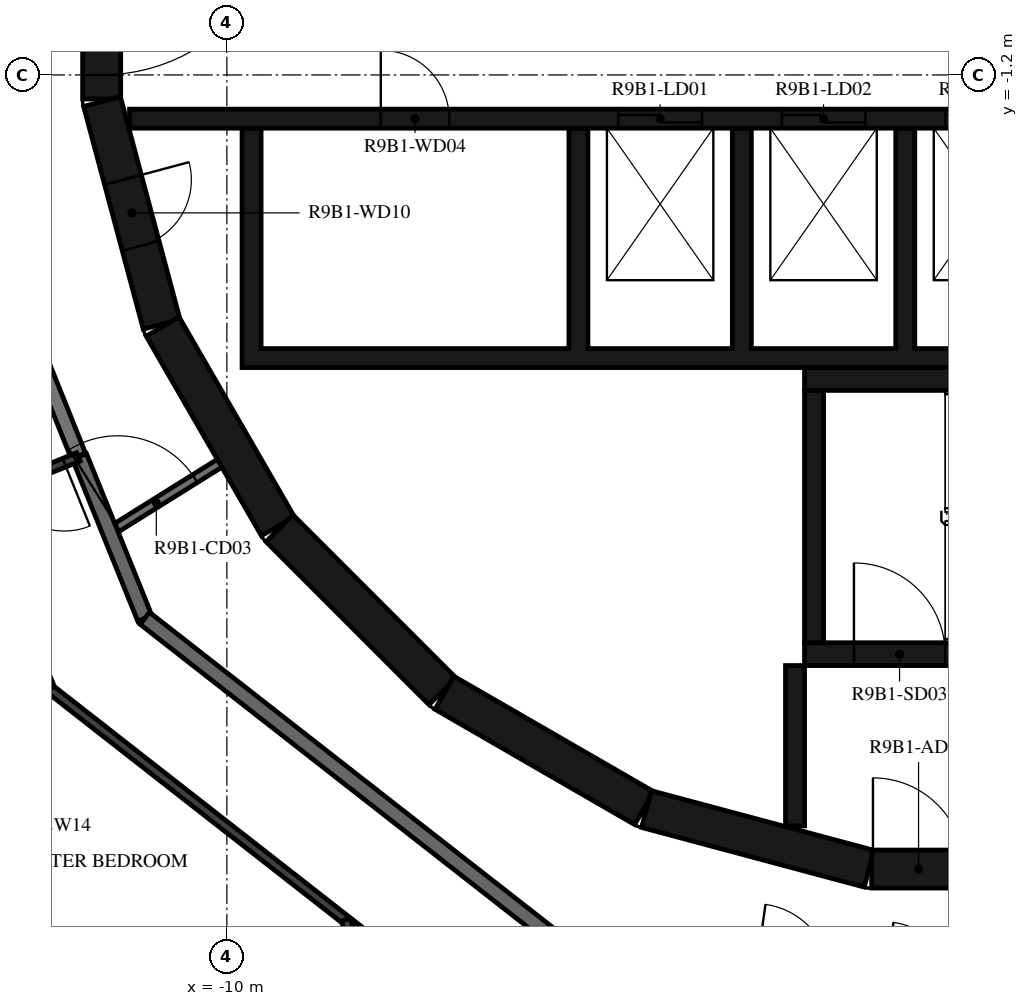
"""IFC4 building model, lengths in metres.
Left out: names, types, materials, properties, quantities, classifications, styles, units other than length and angle.
Written with IfcOpenShell. Run it as: python <this file> out.ifc"""

import sys

from ifc_helpers import new_model, si_unit, direction, frame, frame_2d, origin, place, context, subcontext, project, spatial, polyline, rectangle, outline, extrude, element, fill, save


model = new_model("IFC4")
c1 = context("Model", 3, precision=1e-05, world=origin(), true_north=direction((0.0, 1.0)))
c2 = subcontext(c1, "Body", "Model", "MODEL_VIEW")
j1 = project(units=[si_unit("LENGTHUNIT", "METRE"), si_unit("PLANEANGLEUNIT", "RADIAN")], contexts=[c1])
p1 = place(None, origin())
s1 = spatial("IfcSite", under=j1, at=p1, CompositionType="ELEMENT")
p2 = place(p1, origin())
s2 = spatial("IfcBuilding", under=s1, at=p2, CompositionType="ELEMENT")
p3 = place(p2, frame((0.0, 0.0, 343.5)))
s3 = spatial("IfcBuildingStorey", under=s2, at=p3, CompositionType="ELEMENT", Elevation=343.5)
p4 = place(p3, frame((-11.647, 1.516, 0.0), z_axis=(0.0, 0.0, 1.0), x_axis=(0.0, -1.0, 0.0)))
e1 = element("IfcWall", 1, at=p4, inside=s3, PredefinedType="SHEAR", context=c2, shape_type="SweptSolid", body=[
    extrude(rectangle(XDim=3.033, YDim=0.5, at=frame_2d((1.516, 0.0))), origin(), (0.0, 0.0, 1.0), 3.12),
])
p5 = place(p4, frame((0.316, 0.0, 0.0)))
e2 = element("IfcOpeningElement", 2, at=p5, cuts=e1, PredefinedType="OPENING", context=c2, shape_type="SweptSolid", body=[
    extrude(rectangle(XDim=2.4, YDim=2.1, at=frame_2d((1.2, 1.05))), frame((0.0, 0.26, 0.0), z_axis=(0.0, -1.0, 0.0), x_axis=(1.0, 0.0, 0.0)), (0.0, 0.0, 1.0), 0.52),
])
p6 = place(p3, frame((-11.643, -1.55, 0.0), z_axis=(0.0, 0.0, 1.0), x_axis=(0.258734743916, -0.965948410781, 0.0)))
e3 = element("IfcWall", 3, at=p6, inside=s3, PredefinedType="SHEAR", context=c2, shape_type="SweptSolid", body=[
    extrude(rectangle(XDim=3.033, YDim=0.5, at=frame_2d((1.516, 0.0))), origin(), (0.0, 0.0, 1.0), 3.12),
])
p7 = place(p6, frame((1.066, 0.0, 0.0)))
e4 = element("IfcOpeningElement", 4, at=p7, cuts=e3, PredefinedType="OPENING", context=c2, shape_type="SweptSolid", body=[
    extrude(rectangle(XDim=0.9, YDim=2.1, at=frame_2d((0.45, 1.05))), frame((0.0, 0.26, 0.0), z_axis=(0.0, -1.0, 0.0), x_axis=(1.0, 0.0, 0.0)), (0.0, 0.0, 1.0), 0.52),
])
p8 = place(p3, frame((-10.845, -4.51, 0.0), z_axis=(0.0, 0.0, 1.0), x_axis=(0.500087131594, -0.865975092491, 0.0)))
e5 = element("IfcWall", 5, at=p8, inside=s3, PredefinedType="SHEAR", context=c2, shape_type="SweptSolid", body=[
    extrude(rectangle(XDim=3.033, YDim=0.5, at=frame_2d((1.516, 0.0))), origin(), (0.0, 0.0, 1.0), 3.12),
])
p9 = place(p3, frame((-9.308, -7.164, 0.0), z_axis=(0.0, 0.0, 1.0), x_axis=(0.707106781187, -0.707106781187, 0.0)))
e6 = element("IfcWall", 6, at=p9, inside=s3, PredefinedType="SHEAR", context=c2, shape_type="SweptSolid", body=[
    extrude(rectangle(XDim=3.032, YDim=0.5, at=frame_2d((1.516, 0.0))), origin(), (0.0, 0.0, 1.0), 3.12),
])
for number, where, z_axis, x_axis in (
    (7, (-7.137, -9.329, 0.0), (0.0, 0.0, 1.0), (0.866, -0.5, 0.0)),
    (8, (-4.479, -10.858, 0.0), (0.0, 0.0, 1.0), (0.966, -0.259, 0.0)),
):
    element("IfcWall", number, at=place(p3, frame(where, z_axis=z_axis, x_axis=x_axis)), inside=s3, PredefinedType="SHEAR", context=c2, shape_type="SweptSolid", body=[
        extrude(rectangle(XDim=3.033, YDim=0.5, at=frame_2d((1.516, 0.0))), origin(), (0.0, 0.0, 1.0), 3.12),
    ])
p10 = place(p3, frame((-1.516, -11.647, 0.0), z_axis=(0.0, 0.0, 1.0), x_axis=(1.0, 0.0, 0.0)))
e9 = element("IfcWall", 9, at=p10, inside=s3, PredefinedType="SHEAR", context=c2, shape_type="SweptSolid", body=[
    extrude(rectangle(XDim=3.033, YDim=0.5, at=frame_2d((1.516, 0.0))), origin(), (0.0, 0.0, 1.0), 3.12),
])
p11 = place(p10, frame((0.016, 0.0, 0.0)))
e10 = element("IfcOpeningElement", 10, at=p11, cuts=e9, PredefinedType="OPENING", context=c2, shape_type="SweptSolid", body=[
    extrude(rectangle(XDim=1.2, YDim=2.1, at=frame_2d((0.6, 1.05))), frame((0.0, 0.26, 0.0), z_axis=(0.0, -1.0, 0.0), x_axis=(1.0, 0.0, 0.0)), (0.0, 0.0, 1.0), 0.52),
])
p12 = place(p3, frame((-2.275, -8.67, 0.0), z_axis=(0.0, 0.0, 1.0), x_axis=(0.0, 1.0, 0.0)))
e11 = element("IfcWall", 11, at=p12, inside=s3, PredefinedType="SHEAR", context=c2, shape_type="SweptSolid", body=[
    extrude(rectangle(XDim=3.32, YDim=0.25, at=frame_2d((1.66, 0.0))), origin(), (0.0, 0.0, 1.0), 3.12),
])
p13 = place(p3, frame((-2.4, -5.2, 0.0), z_axis=(0.0, 0.0, 1.0), x_axis=(1.0, 0.0, 0.0)))
e12 = element("IfcWall", 12, at=p13, inside=s3, PredefinedType="SHEAR", context=c2, shape_type="SweptSolid", body=[
    extrude(rectangle(XDim=7.05, YDim=0.3, at=frame_2d((3.525, 0.0))), origin(), (0.0, 0.0, 1.0), 3.12),
])
p14 = place(p3, frame((-2.4, -8.82, 0.0), z_axis=(0.0, 0.0, 1.0), x_axis=(1.0, 0.0, 0.0)))
e13 = element("IfcWall", 13, at=p14, inside=s3, PredefinedType="SHEAR", context=c2, shape_type="SweptSolid", body=[
    extrude(rectangle(XDim=2.5, YDim=0.3, at=frame_2d((1.25, 0.0))), origin(), (0.0, 0.0, 1.0), 3.12),
])
p15 = place(p14, frame((0.65, 0.0, 0.0)))
e14 = element("IfcOpeningElement", 14, at=p15, cuts=e13, PredefinedType="OPENING", context=c2, shape_type="SweptSolid", body=[
    extrude(rectangle(XDim=1.2, YDim=2.1, at=frame_2d((0.6, 1.05))), frame((0.0, 0.16, 0.0), z_axis=(0.0, -1.0, 0.0), x_axis=(1.0, 0.0, 0.0)), (0.0, 0.0, 1.0), 0.32),
])
p16 = place(p3, frame((-2.525, -8.97, 0.0), z_axis=(0.0, 0.0, 1.0), x_axis=(0.0, -1.0, 0.0)))
e15 = element("IfcWall", 15, at=p16, inside=s3, PredefinedType="SHEAR", context=c2, shape_type="SweptSolid", body=[
    extrude(rectangle(XDim=2.11, YDim=0.25, at=frame_2d((1.055, 0.0))), origin(), (0.0, 0.0, 1.0), 3.12),
])
p17 = place(p3, origin())
e16 = element("IfcWall", 16, at=p17, inside=s3, PredefinedType="SHEAR", context=c2, shape_type="SweptSolid", body=[
    extrude(outline(polyline([(9.8, -5.05), (9.8, -4.8), (9.8, -1.9), (9.55, -1.9), (9.55, -4.8), (7.65, -4.8), (7.65, -1.9), (7.4, -1.9), (7.4, -4.8), (5.5, -4.8), (5.5, -1.9), (5.25, -1.9), (5.25, -4.8), (3.35, -4.8), (3.35, -1.9), (3.1, -1.9), (3.1, -4.8), (1.2, -4.8), (1.2, -1.9), (0.95, -1.9), (0.95, -4.8), (-0.95, -4.8), (-0.95, -1.9), (-1.2, -1.9), (-1.2, -4.8), (-3.1, -4.8), (-3.1, -1.9), (-3.35, -1.9), (-3.35, -4.8), (-5.25, -4.8), (-5.25, -1.9), (-5.5, -1.9), (-5.5, -4.8), (-9.55, -4.8), (-9.55, -1.9), (-9.8, -1.9), (-9.8, -4.8), (-9.8, -5.05), (9.8, -5.05)])), origin(), (0.0, 0.0, 1.0), 3.12),
])
p18 = place(p3, frame((-11.28, -1.775, 0.0), z_axis=(0.0, 0.0, 1.0), x_axis=(1.0, 0.0, 0.0)))
e17 = element("IfcWall", 17, at=p18, inside=s3, PredefinedType="SHEAR", context=c2, shape_type="SweptSolid", body=[
    extrude(rectangle(XDim=14.38, YDim=0.25, at=frame_2d((7.19, 0.0))), origin(), (0.0, 0.0, 1.0), 3.12),
])
p19 = place(p18, frame((6.43, 0.0, 0.0)))
e18 = element("IfcOpeningElement", 18, at=p19, cuts=e17, PredefinedType="OPENING", context=c2, shape_type="SweptSolid", body=[
    extrude(rectangle(XDim=1.1, YDim=2.1, at=frame_2d((0.55, 1.05))), frame((0.0, 0.135, 0.0), z_axis=(0.0, -1.0, 0.0), x_axis=(1.0, 0.0, 0.0)), (0.0, 0.0, 1.0), 0.27),
])
p20 = place(p18, frame((8.58, 0.0, 0.0)))
e19 = element("IfcOpeningElement", 19, at=p20, cuts=e17, PredefinedType="OPENING", context=c2, shape_type="SweptSolid", body=[
    extrude(rectangle(XDim=1.1, YDim=2.1, at=frame_2d((0.55, 1.05))), frame((0.0, 0.135, 0.0), z_axis=(0.0, -1.0, 0.0), x_axis=(1.0, 0.0, 0.0)), (0.0, 0.0, 1.0), 0.27),
])
p21 = place(p18, frame((10.73, 0.0, 0.0)))
e20 = element("IfcOpeningElement", 20, at=p21, cuts=e17, PredefinedType="OPENING", context=c2, shape_type="SweptSolid", body=[
    extrude(rectangle(XDim=1.1, YDim=2.1, at=frame_2d((0.55, 1.05))), frame((0.0, 0.135, 0.0), z_axis=(0.0, -1.0, 0.0), x_axis=(1.0, 0.0, 0.0)), (0.0, 0.0, 1.0), 0.27),
])
p22 = place(p18, frame((3.305, 0.0, 0.0)))
e21 = element("IfcOpeningElement", 21, at=p22, cuts=e17, PredefinedType="OPENING", context=c2, shape_type="SweptSolid", body=[
    extrude(rectangle(XDim=0.9, YDim=2.1, at=frame_2d((0.45, 1.05))), frame((0.0, 0.135, 0.0), z_axis=(0.0, -1.0, 0.0), x_axis=(1.0, 0.0, 0.0)), (0.0, 0.0, 1.0), 0.27),
])
p23 = place(p18, frame((12.98, 0.0, 0.0)))
e22 = element("IfcOpeningElement", 22, at=p23, cuts=e17, PredefinedType="OPENING", context=c2, shape_type="SweptSolid", body=[
    extrude(rectangle(XDim=0.9, YDim=2.1, at=frame_2d((0.45, 1.05))), frame((0.0, 0.135, 0.0), z_axis=(0.0, -1.0, 0.0), x_axis=(1.0, 0.0, 0.0)), (0.0, 0.0, 1.0), 0.27),
])
p24 = place(p3, frame((-11.539, -7.21, 0.0), z_axis=(0.0, 0.0, 1.0), x_axis=(0.848103039868, 0.529831325769, 0.0)))
e23 = element("IfcWall", 23, at=p24, inside=s3, PredefinedType="PARTITIONING", context=c2, shape_type="SweptSolid", body=[
    extrude(rectangle(XDim=1.702, YDim=0.12, at=frame_2d((0.851, 0.0))), origin(), (0.0, 0.0, 1.0), 3.12),
])
p25 = place(p24, frame((0.12, 0.0, 0.0)))
e24 = element("IfcOpeningElement", 24, at=p25, cuts=e23, PredefinedType="OPENING", context=c2, shape_type="SweptSolid", body=[
    extrude(rectangle(XDim=1.2, YDim=2.1, at=frame_2d((0.6, 1.05))), frame((0.0, 0.07, 0.0), z_axis=(0.0, -1.0, 0.0), x_axis=(1.0, 0.0, 0.0)), (0.0, 0.0, 1.0), 0.14),
])
p26 = place(p3, frame((-13.769, -1.691, 0.0), z_axis=(0.0, 0.0, 1.0), x_axis=(0.372720094028, -0.927943819155, 0.0)))
e25 = element("IfcWall", 25, at=p26, inside=s3, PredefinedType="STANDARD", context=c2, shape_type="SweptSolid", body=[
    extrude(rectangle(XDim=4.875, YDim=0.2, at=frame_2d((2.438, 0.0))), origin(), (0.0, 0.0, 1.0), 3.12),
])
p27 = place(p3, frame((-11.939, -6.22, 0.0), z_axis=(0.0, 0.0, 1.0), x_axis=(0.374651128394, -0.927165860024, 0.0)))
e26 = element("IfcWall", 26, at=p27, inside=s3, PredefinedType="STANDARD", context=c2, shape_type="SweptSolid", body=[
    extrude(rectangle(XDim=2.296, YDim=0.2, at=frame_2d((1.148, 0.0))), origin(), (0.0, 0.0, 1.0), 3.12),
])
p28 = place(p3, frame((-11.079, -8.349, 0.0), z_axis=(0.0, 0.0, 1.0), x_axis=(0.78800478687, -0.615669112324, 0.0)))
e27 = element("IfcWall", 27, at=p28, inside=s3, PredefinedType="STANDARD", context=c2, shape_type="SweptSolid", body=[
    extrude(rectangle(XDim=7.181, YDim=0.2, at=frame_2d((3.591, 0.0))), origin(), (0.0, 0.0, 1.0), 3.12),
])
p29 = place(p3, frame((-11.953, -6.225, 0.0), z_axis=(0.0, 0.0, 1.0), x_axis=(-0.927144096717, -0.374704982518, 0.0)))
e28 = element("IfcWall", 28, at=p29, inside=s3, PredefinedType="PARTITIONING", context=c2, shape_type="SweptSolid", body=[
    extrude(rectangle(XDim=1.485, YDim=0.12, at=frame_2d((0.742, 0.0))), origin(), (0.0, 0.0, 1.0), 3.12),
])
p30 = place(p29, frame((0.2, 0.0, 0.0)))
e29 = element("IfcOpeningElement", 29, at=p30, cuts=e28, PredefinedType="OPENING", context=c2, shape_type="SweptSolid", body=[
    extrude(rectangle(XDim=0.9, YDim=2.1, at=frame_2d((0.45, 1.05))), frame((0.0, 0.07, 0.0), z_axis=(0.0, -1.0, 0.0), x_axis=(1.0, 0.0, 0.0)), (0.0, 0.0, 1.0), 0.14),
])
p31 = place(p3, frame((-13.33, -6.782, 0.0), z_axis=(0.0, 0.0, 1.0), x_axis=(0.374602180132, -0.927185637637, 0.0)))
e30 = element("IfcWall", 30, at=p31, inside=s3, PredefinedType="PARTITIONING", context=c2, shape_type="SweptSolid", body=[
    extrude(rectangle(XDim=2.698, YDim=0.12, at=frame_2d((1.349, 0.0))), origin(), (0.0, 0.0, 1.0), 3.12),
])
p32 = place(p3, frame((-12.319, -9.283, 0.0), z_axis=(0.0, 0.0, 1.0), x_axis=(0.788000268464, -0.61567489546, 0.0)))
e31 = element("IfcWall", 31, at=p32, inside=s3, PredefinedType="PARTITIONING", context=c2, shape_type="SweptSolid", body=[
    extrude(rectangle(XDim=7.985, YDim=0.12, at=frame_2d((3.992, 0.0))), origin(), (0.0, 0.0, 1.0), 3.12),
])
p33 = place(p32, frame((6.423, 0.0, 0.0)))
e32 = element("IfcOpeningElement", 32, at=p33, cuts=e31, PredefinedType="OPENING", context=c2, shape_type="SweptSolid", body=[
    extrude(rectangle(XDim=0.9, YDim=2.1, at=frame_2d((0.45, 1.05))), frame((0.0, 0.07, 0.0), z_axis=(0.0, -1.0, 0.0), x_axis=(1.0, 0.0, 0.0)), (0.0, 0.0, 1.0), 0.14),
])
p34 = place(p3, frame((-5.894, -18.616, 0.0), z_axis=(0.0, 0.0, 1.0), x_axis=(-0.374596683143, 0.927187858515, 0.0)))
e33 = element("IfcWall", 33, at=p34, inside=s3, PredefinedType="PARTITIONING", context=c2, shape_type="SweptSolid", body=[
    extrude(rectangle(XDim=6.796, YDim=0.12, at=frame_2d((3.398, 0.0))), origin(), (0.0, 0.0, 1.0), 3.12),
])
p35 = place(p34, frame((2.822, 0.0, 0.0)))
e34 = element("IfcOpeningElement", 34, at=p35, cuts=e33, PredefinedType="OPENING", context=c2, shape_type="SweptSolid", body=[
    extrude(rectangle(XDim=0.9, YDim=2.1, at=frame_2d((0.45, 1.05))), frame((0.0, 0.07, 0.0), z_axis=(0.0, -1.0, 0.0), x_axis=(1.0, 0.0, 0.0)), (0.0, 0.0, 1.0), 0.14),
])
p36 = place(p15, origin())
e35 = element("IfcDoor", 35, at=p36, inside=s3, OperationType="SINGLE_SWING_LEFT", PredefinedType="DOOR", context=c2, shape_type="SweptSolid", body=[
    extrude(rectangle(XDim=1.2, YDim=2.1, at=frame_2d((0.6, 1.05))), frame((0.0, 0.025, 0.0), z_axis=(0.0, -1.0, 0.0), x_axis=(1.0, 0.0, 0.0)), (0.0, 0.0, 1.0), 0.05),
])
fill(e14, e35)
p37 = place(p11, origin())
e36 = element("IfcDoor", 36, at=p37, inside=s3, OperationType="SINGLE_SWING_RIGHT", PredefinedType="DOOR", context=c2, shape_type="SweptSolid", body=[
    extrude(rectangle(XDim=1.2, YDim=2.1, at=frame_2d((0.6, 1.05))), frame((0.0, 0.025, 0.0), z_axis=(0.0, -1.0, 0.0), x_axis=(1.0, 0.0, 0.0)), (0.0, 0.0, 1.0), 0.05),
])
fill(e10, e36)
p38 = place(p5, origin())
e37 = element("IfcDoor", 37, at=p38, inside=s3, OperationType="DOUBLE_DOOR_SINGLE_SWING", PredefinedType="DOOR", context=c2, shape_type="SweptSolid", body=[
    extrude(rectangle(XDim=2.4, YDim=2.1, at=frame_2d((1.2, 1.05))), frame((0.0, 0.025, 0.0), z_axis=(0.0, -1.0, 0.0), x_axis=(1.0, 0.0, 0.0)), (0.0, 0.0, 1.0), 0.05),
])
fill(e2, e37)
p39 = place(p19, origin())
e38 = element("IfcDoor", 38, at=p39, inside=s3, OperationType="DOUBLE_DOOR_SLIDING", PredefinedType="DOOR", context=c2, shape_type="SweptSolid", body=[
    extrude(rectangle(XDim=1.1, YDim=2.1, at=frame_2d((0.55, 1.05))), frame((0.0, 0.025, 0.0), z_axis=(0.0, -1.0, 0.0), x_axis=(1.0, 0.0, 0.0)), (0.0, 0.0, 1.0), 0.05),
])
fill(e18, e38)
p40 = place(p20, origin())
e39 = element("IfcDoor", 39, at=p40, inside=s3, OperationType="DOUBLE_DOOR_SLIDING", PredefinedType="DOOR", context=c2, shape_type="SweptSolid", body=[
    extrude(rectangle(XDim=1.1, YDim=2.1, at=frame_2d((0.55, 1.05))), frame((0.0, 0.025, 0.0), z_axis=(0.0, -1.0, 0.0), x_axis=(1.0, 0.0, 0.0)), (0.0, 0.0, 1.0), 0.05),
])
fill(e19, e39)
p41 = place(p21, origin())
e40 = element("IfcDoor", 40, at=p41, inside=s3, OperationType="DOUBLE_DOOR_SLIDING", PredefinedType="DOOR", context=c2, shape_type="SweptSolid", body=[
    extrude(rectangle(XDim=1.1, YDim=2.1, at=frame_2d((0.55, 1.05))), frame((0.0, 0.025, 0.0), z_axis=(0.0, -1.0, 0.0), x_axis=(1.0, 0.0, 0.0)), (0.0, 0.0, 1.0), 0.05),
])
fill(e20, e40)
p42 = place(p22, origin())
e41 = element("IfcDoor", 41, at=p42, inside=s3, OperationType="SINGLE_SWING_RIGHT", PredefinedType="DOOR", context=c2, shape_type="SweptSolid", body=[
    extrude(rectangle(XDim=0.9, YDim=2.1, at=frame_2d((0.45, 1.05))), frame((0.0, 0.025, 0.0), z_axis=(0.0, -1.0, 0.0), x_axis=(1.0, 0.0, 0.0)), (0.0, 0.0, 1.0), 0.05),
])
fill(e21, e41)
p43 = place(p7, origin())
e42 = element("IfcDoor", 42, at=p43, inside=s3, OperationType="SINGLE_SWING_RIGHT", PredefinedType="DOOR", context=c2, shape_type="SweptSolid", body=[
    extrude(rectangle(XDim=0.9, YDim=2.1, at=frame_2d((0.45, 1.05))), frame((0.0, 0.025, 0.0), z_axis=(0.0, -1.0, 0.0), x_axis=(1.0, 0.0, 0.0)), (0.0, 0.0, 1.0), 0.05),
])
fill(e4, e42)
p44 = place(p30, origin())
e43 = element("IfcDoor", 43, at=p44, inside=s3, OperationType="SINGLE_SWING_LEFT", PredefinedType="DOOR", context=c2, shape_type="SweptSolid", body=[
    extrude(rectangle(XDim=0.9, YDim=2.1, at=frame_2d((0.45, 1.05))), frame((0.0, 0.025, 0.0), z_axis=(0.0, -1.0, 0.0), x_axis=(1.0, 0.0, 0.0)), (0.0, 0.0, 1.0), 0.05),
])
fill(e29, e43)
p45 = place(p25, origin())
e44 = element("IfcDoor", 44, at=p45, inside=s3, OperationType="DOUBLE_DOOR_SINGLE_SWING", PredefinedType="DOOR", context=c2, shape_type="SweptSolid", body=[
    extrude(rectangle(XDim=1.2, YDim=2.1, at=frame_2d((0.6, 1.05))), frame((0.0, 0.025, 0.0), z_axis=(0.0, -1.0, 0.0), x_axis=(1.0, 0.0, 0.0)), (0.0, 0.0, 1.0), 0.05),
])
fill(e24, e44)
save(model, sys.argv[1])
